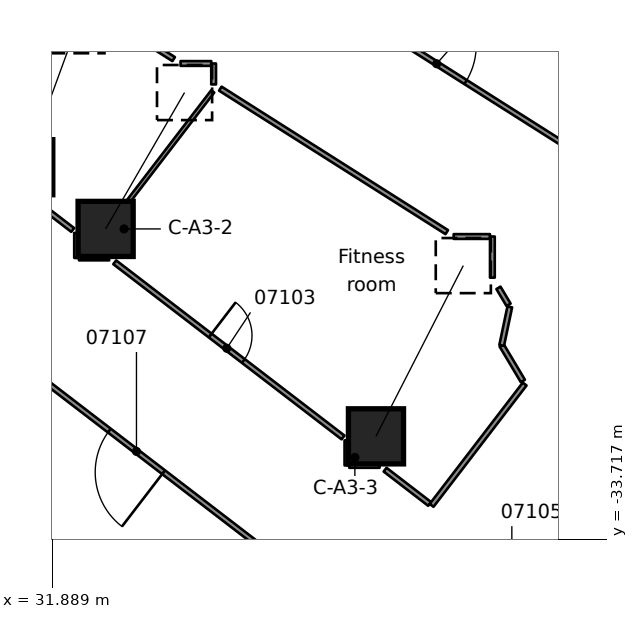
"""IFC4 building model, lengths in metres.
Left out: names, types, materials, properties, quantities, classifications, styles, units other than length and angle.
Written with IfcOpenShell. Run it as: python <this file> out.ifc"""

import sys

from ifc_helpers import new_model, si_unit, direction, frame, frame_2d, origin, origin_2d, place, context, subcontext, project, spatial, rectangle, extrude, element, fill, save


model = new_model("IFC4")
c1 = context("Model", 3, precision=1e-05, world=origin(), true_north=direction((0.0, 1.0)))
c2 = subcontext(c1, "Body", "Model", "MODEL_VIEW")
j1 = project(units=[si_unit("LENGTHUNIT", "METRE"), si_unit("PLANEANGLEUNIT", "RADIAN")], contexts=[c1])
p1 = place(None, origin())
s1 = spatial("IfcSite", under=j1, at=p1, CompositionType="ELEMENT")
p2 = place(p1, origin())
s2 = spatial("IfcBuilding", under=s1, at=p2, CompositionType="ELEMENT")
p3 = place(p2, frame((0.0, 0.0, 33.3)))
s3 = spatial("IfcBuildingStorey", under=s2, at=p3, CompositionType="ELEMENT", Elevation=33.3)
p4 = place(p3, frame((33.294, -25.548, 0.601), z_axis=(0.415263925558, 0.717340610475, 0.559444653825), x_axis=(-0.865446442826, 0.501001451695, 0.0)))
e1 = element("IfcColumn", 1, at=p4, inside=s3, PredefinedType="COLUMN", context=c2, shape_type="SweptSolid", body=[
    extrude(rectangle(XDim=1.45, YDim=1.45, at=origin_2d()), origin(), (0.0, 0.0, 1.0), 5.002),
])
p5 = place(p3, frame((40.408, -31.006, 0.638), z_axis=(0.400711857271, 0.78345915449, 0.474996590187), x_axis=(-0.890307002668, 0.455360781141, 0.0)))
e2 = element("IfcColumn", 2, at=p5, inside=s3, PredefinedType="COLUMN", context=c2, shape_type="SweptSolid", body=[
    extrude(rectangle(XDim=1.45, YDim=1.45, at=origin_2d()), origin(), (0.0, 0.0, 1.0), 5.735),
])
p6 = place(p3, frame((31.179, -23.924, 0.591), z_axis=(0.279657049767, 0.765530427024, 0.579443784862), x_axis=(-0.939287067036, 0.343132344292, 0.0)))
e3 = element("IfcColumn", 3, at=p6, inside=s3, PredefinedType="COLUMN", context=c2, shape_type="SweptSolid", body=[
    extrude(rectangle(XDim=1.45, YDim=1.45, at=origin_2d()), origin(), (0.0, 0.0, 1.0), 4.864),
])
p7 = place(p3, frame((43.631, -27.098, 0.0), z_axis=(0.0, 0.0, 1.0), x_axis=(0.511178490391, -0.859474578426, 0.0)))
e4 = element("IfcWall", 4, at=p7, inside=s3, PredefinedType="PARTITIONING", context=c2, shape_type="SweptSolid", body=[
    extrude(rectangle(XDim=0.52, YDim=0.125, at=frame_2d((0.26, 0.0))), origin(), (0.0, 0.0, 1.0), 3.56),
])
p8 = place(p3, frame((43.716, -28.613, 0.0), z_axis=(0.0, 0.0, 1.0), x_axis=(0.511956455833, -0.859011401165, 0.0)))
e5 = element("IfcWall", 5, at=p8, inside=s3, PredefinedType="PARTITIONING", context=c2, shape_type="SweptSolid", body=[
    extrude(rectangle(XDim=1.09, YDim=0.125, at=frame_2d((0.545, 0.0))), origin(), (0.0, 0.0, 1.0), 3.56),
])
p9 = place(p3, frame((37.331, -33.877, 0.0), z_axis=(0.0, 0.0, 1.0), x_axis=(-0.793351723993, 0.608763535404, 0.0)))
e6 = element("IfcWall", 6, at=p9, inside=s3, PredefinedType="PARTITIONING", context=c2, shape_type="SweptSolid", body=[
    extrude(rectangle(XDim=16.686, YDim=0.125, at=frame_2d((8.343, 0.0))), origin(), (0.0, 0.0, 1.0), 3.56),
])
p10 = place(p9, frame((11.84, 0.0, 0.0)))
e7 = element("IfcOpeningElement", 7, at=p10, cuts=e6, PredefinedType="OPENING", context=c2, shape_type="SweptSolid", body=[
    extrude(rectangle(XDim=1.8, YDim=2.1, at=frame_2d((0.9, 1.05))), frame((0.0, 0.073, 0.0), z_axis=(0.0, -1.0, 0.0), x_axis=(1.0, 0.0, 0.0)), (0.0, 0.0, 1.0), 0.145),
])
p11 = place(p9, frame((3.166, 0.0, 0.0)))
e8 = element("IfcOpeningElement", 8, at=p11, cuts=e6, PredefinedType="OPENING", context=c2, shape_type="SweptSolid", body=[
    extrude(rectangle(XDim=1.8, YDim=2.1, at=frame_2d((0.9, 1.05))), frame((0.0, 0.073, 0.0), z_axis=(0.0, -1.0, 0.0), x_axis=(1.0, 0.0, 0.0)), (0.0, 0.0, 1.0), 0.145),
])
p12 = place(p3, frame((31.418, -24.801, 0.0), z_axis=(0.0, 0.0, 1.0), x_axis=(0.793393328304, -0.608709312071, 0.0)))
e9 = element("IfcWall", 9, at=p12, inside=s3, PredefinedType="PARTITIONING", context=c2, shape_type="SweptSolid", body=[
    extrude(rectangle(XDim=1.273, YDim=0.125, at=frame_2d((0.636, 0.0))), origin(), (0.0, 0.0, 1.0), 3.56),
])
p13 = place(p3, frame((33.534, -26.426, 0.0), z_axis=(0.0, 0.0, 1.0), x_axis=(0.793385739593, -0.60871920309, 0.0)))
e10 = element("IfcWall", 10, at=p13, inside=s3, PredefinedType="PARTITIONING", context=c2, shape_type="SweptSolid", body=[
    extrude(rectangle(XDim=7.572, YDim=0.125, at=frame_2d((3.786, 0.0))), origin(), (0.0, 0.0, 1.0), 3.56),
])
p14 = place(p13, frame((3.166, 0.0, 0.0)))
e11 = element("IfcOpeningElement", 11, at=p14, cuts=e10, PredefinedType="OPENING", context=c2, shape_type="SweptSolid", body=[
    extrude(rectangle(XDim=1.1, YDim=2.1, at=frame_2d((0.55, 1.05))), frame((0.0, 0.073, 0.0), z_axis=(0.0, -1.0, 0.0), x_axis=(1.0, 0.0, 0.0)), (0.0, 0.0, 1.0), 0.145),
])
p15 = place(p3, frame((40.648, -31.883, 0.0), z_axis=(0.0, 0.0, 1.0), x_axis=(0.792869496174, -0.609391468628, 0.0)))
e12 = element("IfcWall", 12, at=p15, inside=s3, PredefinedType="PARTITIONING", context=c2, shape_type="SweptSolid", body=[
    extrude(rectangle(XDim=1.478, YDim=0.125, at=frame_2d((0.739, 0.0))), origin(), (0.0, 0.0, 1.0), 3.56),
])
p16 = place(p3, frame((33.4, -20.013, 0.0), z_axis=(0.0, 0.0, 1.0), x_axis=(0.844693587084, -0.53525016949, 0.0)))
e13 = element("IfcWall", 13, at=p16, inside=s3, PredefinedType="PARTITIONING", context=c2, shape_type="SweptSolid", body=[
    extrude(rectangle(XDim=1.994, YDim=0.125, at=frame_2d((0.997, 0.0))), origin(), (0.0, 0.0, 1.0), 3.56),
])
p17 = place(p3, frame((36.312, -21.857, 0.0), z_axis=(0.0, 0.0, 1.0), x_axis=(0.844684518411, -0.535264480755, 0.0)))
e14 = element("IfcWall", 14, at=p17, inside=s3, PredefinedType="PARTITIONING", context=c2, shape_type="SweptSolid", body=[
    extrude(rectangle(XDim=7.055, YDim=0.125, at=frame_2d((3.527, 0.0))), origin(), (0.0, 0.0, 1.0), 3.56),
])
p18 = place(p3, frame((38.458, -18.955, 0.0), z_axis=(0.0, 0.0, 1.0), x_axis=(0.84479374754, -0.535092070692, 0.0)))
e15 = element("IfcWall", 15, at=p18, inside=s3, PredefinedType="PARTITIONING", context=c2, shape_type="SweptSolid", body=[
    extrude(rectangle(XDim=8.279, YDim=0.125, at=frame_2d((4.139, 0.0))), origin(), (0.0, 0.0, 1.0), 3.56),
])
p19 = place(p18, frame((3.3, 0.0, 0.0)))
e16 = element("IfcOpeningElement", 16, at=p19, cuts=e15, PredefinedType="OPENING", context=c2, shape_type="SweptSolid", body=[
    extrude(rectangle(XDim=1.8, YDim=2.1, at=frame_2d((0.9, 1.05))), frame((0.0, 0.073, 0.0), z_axis=(0.0, -1.0, 0.0), x_axis=(1.0, 0.0, 0.0)), (0.0, 0.0, 1.0), 0.145),
])
p20 = place(p3, frame((39.706, -31.771, 0.0), z_axis=(0.0, 0.0, 1.0), x_axis=(1.0, 0.0, 0.0)))
e17 = element("IfcWall", 17, at=p20, inside=s3, PredefinedType="PARTITIONING", context=c2, shape_type="SweptSolid", body=[
    extrude(rectangle(XDim=0.796, YDim=0.125, at=frame_2d((0.398, 0.0))), origin(), (0.0, 0.0, 1.0), 3.56),
])
p21 = place(p3, frame((32.593, -26.312, 0.0), z_axis=(0.0, 0.0, 1.0), x_axis=(1.0, 0.0, 0.0)))
e18 = element("IfcWall", 18, at=p21, inside=s3, PredefinedType="PARTITIONING", context=c2, shape_type="SweptSolid", body=[
    extrude(rectangle(XDim=0.795, YDim=0.125, at=frame_2d((0.397, 0.0))), origin(), (0.0, 0.0, 1.0), 3.56),
])
p22 = place(p3, frame((42.453, -25.748, 0.0), z_axis=(0.0, 0.0, 1.0), x_axis=(1.0, 0.0, 0.0)))
e19 = element("IfcWall", 19, at=p22, inside=s3, PredefinedType="PARTITIONING", context=c2, shape_type="SweptSolid", body=[
    extrude(rectangle(XDim=0.955, YDim=0.125, at=frame_2d((0.478, 0.0))), origin(), (0.0, 0.0, 1.0), 3.56),
])
p23 = place(p3, frame((35.266, -21.195, 0.0), z_axis=(0.0, 0.0, 1.0), x_axis=(1.0, 0.0, 0.0)))
e20 = element("IfcWall", 20, at=p23, inside=s3, PredefinedType="PARTITIONING", context=c2, shape_type="SweptSolid", body=[
    extrude(rectangle(XDim=0.808, YDim=0.125, at=frame_2d((0.404, 0.0))), origin(), (0.0, 0.0, 1.0), 3.56),
])
p24 = place(p3, frame((43.716, -28.613, 0.0), z_axis=(0.0, 0.0, 1.0), x_axis=(0.205677625046, 0.978619800819, 0.0)))
e21 = element("IfcWall", 21, at=p24, inside=s3, PredefinedType="PARTITIONING", context=c2, shape_type="SweptSolid", body=[
    extrude(rectangle(XDim=1.035, YDim=0.125, at=frame_2d((0.518, 0.0))), origin(), (0.0, 0.0, 1.0), 3.56),
])
p25 = place(p3, frame((48.476, -30.13, 0.0), z_axis=(0.0, 0.0, 1.0), x_axis=(-0.608819151361, -0.793309045036, 0.0)))
e22 = element("IfcWall", 22, at=p25, inside=s3, PredefinedType="PARTITIONING", context=c2, shape_type="SweptSolid", body=[
    extrude(rectangle(XDim=9.757, YDim=0.125, at=frame_2d((4.878, 0.0))), origin(), (0.0, 0.0, 1.0), 3.56),
])
p26 = place(p25, frame((6.479, 0.0, 0.0)))
e23 = element("IfcOpeningElement", 23, at=p26, cuts=e22, PredefinedType="OPENING", context=c2, shape_type="SweptSolid", body=[
    extrude(rectangle(XDim=1.8, YDim=2.1, at=frame_2d((0.9, 1.05))), frame((0.0, 0.073, 0.0), z_axis=(0.0, -1.0, 0.0), x_axis=(1.0, 0.0, 0.0)), (0.0, 0.0, 1.0), 0.145),
])
p27 = place(p3, frame((41.872, -32.822, 0.0), z_axis=(0.0, 0.0, 1.0), x_axis=(0.60869266474, 0.793406100236, 0.0)))
e24 = element("IfcWall", 24, at=p27, inside=s3, PredefinedType="PARTITIONING", context=c2, shape_type="SweptSolid", body=[
    extrude(rectangle(XDim=4.023, YDim=0.125, at=frame_2d((2.012, 0.0))), origin(), (0.0, 0.0, 1.0), 3.56),
])
p28 = place(p3, frame((32.821, -26.219, 0.0), z_axis=(0.0, 0.0, 1.0), x_axis=(0.608776494461, 0.793341779936, 0.0)))
e25 = element("IfcWall", 25, at=p28, inside=s3, PredefinedType="PARTITIONING", context=c2, shape_type="SweptSolid", body=[
    extrude(rectangle(XDim=5.407, YDim=0.1, at=frame_2d((2.704, 0.0))), origin(), (0.0, 0.0, 1.0), 3.56),
])
p29 = place(p3, frame((43.471, -26.83, 0.0), z_axis=(0.0, 0.0, 1.0), x_axis=(0.0, 1.0, 0.0)))
e26 = element("IfcWall", 26, at=p29, inside=s3, PredefinedType="PARTITIONING", context=c2, shape_type="SweptSolid", body=[
    extrude(rectangle(XDim=1.082, YDim=0.125, at=frame_2d((0.541, 0.0))), origin(), (0.0, 0.0, 1.0), 3.56),
])
p30 = place(p3, frame((39.644, -31.771, 0.0), z_axis=(0.0, 0.0, 1.0), x_axis=(0.0, 1.0, 0.0)))
e27 = element("IfcWall", 27, at=p30, inside=s3, PredefinedType="PARTITIONING", context=c2, shape_type="SweptSolid", body=[
    extrude(rectangle(XDim=0.659, YDim=0.125, at=frame_2d((0.33, 0.0))), origin(), (0.0, 0.0, 1.0), 3.56),
])
p31 = place(p3, frame((36.136, -21.746, 0.0), z_axis=(0.0, 0.0, 1.0), x_axis=(0.0, 1.0, 0.0)))
e28 = element("IfcWall", 28, at=p31, inside=s3, PredefinedType="PARTITIONING", context=c2, shape_type="SweptSolid", body=[
    extrude(rectangle(XDim=0.551, YDim=0.125, at=frame_2d((0.275, 0.0))), origin(), (0.0, 0.0, 1.0), 3.56),
])
p32 = place(p3, frame((32.53, -26.312, 0.0), z_axis=(0.0, 0.0, 1.0), x_axis=(0.0, 1.0, 0.0)))
e29 = element("IfcWall", 29, at=p32, inside=s3, PredefinedType="PARTITIONING", context=c2, shape_type="SweptSolid", body=[
    extrude(rectangle(XDim=0.658, YDim=0.125, at=frame_2d((0.329, 0.0))), origin(), (0.0, 0.0, 1.0), 3.56),
])
p33 = place(p19, origin())
e30 = element("IfcDoor", 30, at=p33, inside=s3, OperationType="DOUBLE_DOOR_SINGLE_SWING", PredefinedType="DOOR", context=c2, shape_type="SweptSolid", body=[
    extrude(rectangle(XDim=1.8, YDim=2.1, at=frame_2d((0.9, 1.05))), frame((0.0, 0.025, 0.0), z_axis=(0.0, -1.0, 0.0), x_axis=(1.0, 0.0, 0.0)), (0.0, 0.0, 1.0), 0.05),
])
fill(e16, e30)
p34 = place(p14, origin())
e31 = element("IfcDoor", 31, at=p34, inside=s3, OperationType="SINGLE_SWING_LEFT", PredefinedType="DOOR", context=c2, shape_type="SweptSolid", body=[
    extrude(rectangle(XDim=1.1, YDim=2.1, at=frame_2d((0.55, 1.05))), frame((0.0, 0.025, 0.0), z_axis=(0.0, -1.0, 0.0), x_axis=(1.0, 0.0, 0.0)), (0.0, 0.0, 1.0), 0.05),
])
fill(e11, e31)
p35 = place(p11, origin())
e32 = element("IfcDoor", 32, at=p35, inside=s3, OperationType="DOUBLE_DOOR_SINGLE_SWING", PredefinedType="DOOR", context=c2, shape_type="SweptSolid", body=[
    extrude(rectangle(XDim=1.8, YDim=2.1, at=frame_2d((0.9, 1.05))), frame((0.0, 0.025, 0.0), z_axis=(0.0, -1.0, 0.0), x_axis=(1.0, 0.0, 0.0)), (0.0, 0.0, 1.0), 0.05),
])
fill(e8, e32)
save(model, sys.argv[1])
